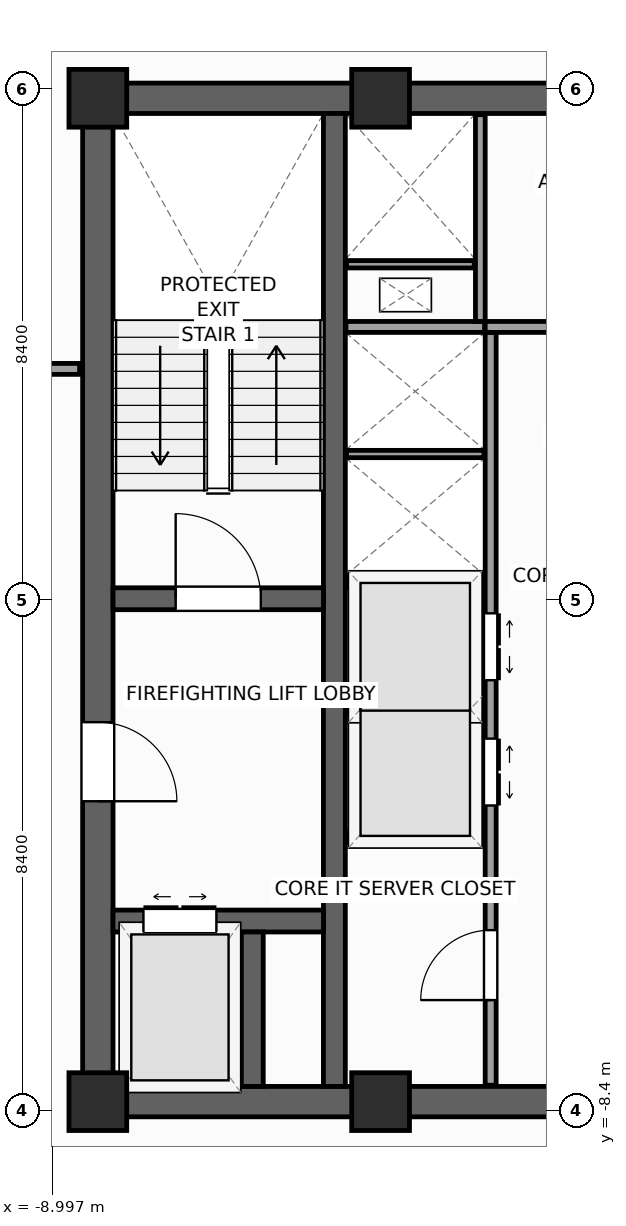
"""IFC4 building model, lengths in metres.
Left out: names, types, materials, properties, quantities, classifications, styles, units other than length and angle.
Written with IfcOpenShell. Run it as: python <this file> out.ifc"""

import sys

from ifc_helpers import new_model, si_unit, direction, frame, frame_2d, origin, origin_2d, place, context, subcontext, project, spatial, rectangle, extrude, source, transform, mapped, element, fill, save


model = new_model("IFC4")
c1 = context("Model", 3, precision=1e-05, world=origin(), true_north=direction((0.0, 1.0)))
c2 = subcontext(c1, "Body", "Model", "MODEL_VIEW")
j1 = project(units=[si_unit("LENGTHUNIT", "METRE"), si_unit("PLANEANGLEUNIT", "RADIAN")], contexts=[c1])
p1 = place(None, origin())
s1 = spatial("IfcSite", under=j1, at=p1, CompositionType="ELEMENT")
p2 = place(p1, origin())
s2 = spatial("IfcBuilding", under=s1, at=p2, CompositionType="ELEMENT")
p3 = place(p2, frame((0.0, 0.0, 229.0)))
s3 = spatial("IfcBuildingStorey", under=s2, at=p3, CompositionType="ELEMENT", Elevation=229.0)
p4 = place(p3, frame((-8.5, -8.25, 0.0), z_axis=(0.0, 0.0, 1.0), x_axis=(1.0, 0.0, 0.0)))
e1 = element("IfcWall", 1, at=p4, inside=s3, PredefinedType="SHEAR", context=c2, shape_type="SweptSolid", body=[
    extrude(rectangle(XDim=17.0, YDim=0.5, at=frame_2d((8.5, 0.0))), origin(), (0.0, 0.0, 1.0), 3.9),
])
p5 = place(p4, frame((7.85, 0.0, 0.0)))
e2 = element("IfcOpeningElement", 2, at=p5, cuts=e1, PredefinedType="OPENING", context=c2, shape_type="SweptSolid", body=[
    extrude(rectangle(XDim=1.3, YDim=2.2, at=frame_2d((0.65, 1.1))), frame((0.0, 0.26, 0.0), z_axis=(0.0, -1.0, 0.0), x_axis=(1.0, 0.0, 0.0)), (0.0, 0.0, 1.0), 0.52),
])
p6 = place(p3, frame((-8.5, 8.25, 0.0), z_axis=(0.0, 0.0, 1.0), x_axis=(1.0, 0.0, 0.0)))
e3 = element("IfcWall", 3, at=p6, inside=s3, PredefinedType="SHEAR", context=c2, shape_type="SweptSolid", body=[
    extrude(rectangle(XDim=17.0, YDim=0.5, at=frame_2d((8.5, 0.0))), origin(), (0.0, 0.0, 1.0), 3.9),
])
p7 = place(p3, frame((-8.25, -8.0, 0.0), z_axis=(0.0, 0.0, 1.0), x_axis=(0.0, 1.0, 0.0)))
e4 = element("IfcWall", 4, at=p7, inside=s3, PredefinedType="SHEAR", context=c2, shape_type="SweptSolid", body=[
    extrude(rectangle(XDim=16.0, YDim=0.5, at=frame_2d((8.0, 0.0))), origin(), (0.0, 0.0, 1.0), 3.9),
])
p8 = place(p7, frame((4.69, 0.0, 0.0)))
e5 = element("IfcOpeningElement", 5, at=p8, cuts=e4, PredefinedType="OPENING", context=c2, shape_type="SweptSolid", body=[
    extrude(rectangle(XDim=1.3, YDim=2.2, at=frame_2d((0.65, 1.1))), frame((0.0, 0.26, 0.0), z_axis=(0.0, -1.0, 0.0), x_axis=(1.0, 0.0, 0.0)), (0.0, 0.0, 1.0), 0.52),
])
p9 = place(p3, frame((-4.36, -8.0, 0.0), z_axis=(0.0, 0.0, 1.0), x_axis=(0.0, 1.0, 0.0)))
e6 = element("IfcWall", 6, at=p9, inside=s3, PredefinedType="SHEAR", context=c2, shape_type="SweptSolid", body=[
    extrude(rectangle(XDim=16.0, YDim=0.36, at=frame_2d((8.0, 0.0))), origin(), (0.0, 0.0, 1.0), 3.9),
])
p10 = place(p3, frame((-8.0, 0.02, 0.0), z_axis=(0.0, 0.0, 1.0), x_axis=(1.0, 0.0, 0.0)))
e7 = element("IfcWall", 7, at=p10, inside=s3, PredefinedType="SHEAR", context=c2, shape_type="SweptSolid", body=[
    extrude(rectangle(XDim=3.46, YDim=0.36, at=frame_2d((1.73, 0.0))), origin(), (0.0, 0.0, 1.0), 3.9),
])
p11 = place(p10, frame((1.03, 0.0, 0.0)))
e8 = element("IfcOpeningElement", 8, at=p11, cuts=e7, PredefinedType="OPENING", context=c2, shape_type="SweptSolid", body=[
    extrude(rectangle(XDim=1.4, YDim=2.2, at=frame_2d((0.7, 1.1))), frame((0.0, 0.19, 0.0), z_axis=(0.0, -1.0, 0.0), x_axis=(1.0, 0.0, 0.0)), (0.0, 0.0, 1.0), 0.38),
])
p12 = place(p3, frame((-8.0, -5.28, 0.0), z_axis=(0.0, 0.0, 1.0), x_axis=(1.0, 0.0, 0.0)))
e9 = element("IfcWall", 9, at=p12, inside=s3, PredefinedType="SHEAR", context=c2, shape_type="SweptSolid", body=[
    extrude(rectangle(XDim=3.46, YDim=0.36, at=frame_2d((1.73, 0.0))), origin(), (0.0, 0.0, 1.0), 3.9),
])
p13 = place(p12, frame((0.5, 0.0, 0.0)))
e10 = element("IfcOpeningElement", 10, at=p13, cuts=e9, PredefinedType="OPENING", context=c2, shape_type="SweptSolid", body=[
    extrude(rectangle(XDim=1.2, YDim=2.25, at=frame_2d((0.6, 1.125))), frame((0.0, 0.19, 0.0), z_axis=(0.0, -1.0, 0.0), x_axis=(1.0, 0.0, 0.0)), (0.0, 0.0, 1.0), 0.38),
])
p14 = place(p3, frame((-5.71, -8.0, 0.0), z_axis=(0.0, 0.0, 1.0), x_axis=(0.0, 1.0, 0.0)))
e11 = element("IfcWall", 11, at=p14, inside=s3, PredefinedType="SHEAR", context=c2, shape_type="SweptSolid", body=[
    extrude(rectangle(XDim=2.54, YDim=0.36, at=frame_2d((1.27, 0.0))), origin(), (0.0, 0.0, 1.0), 3.9),
])
m1 = source(origin(), c2, "Body", "SweptSolid", [
    extrude(rectangle(XDim=0.95, YDim=0.95, at=origin_2d()), origin(), (0.0, 0.0, 1.0), 3.9),
])
for number, where, z_axis, x_axis in (
    (12, (-8.25, -8.25, 0.0), (0.0, 0.0, 1.0), (1.0, 0.0, 0.0)),
    (13, (-8.25, 8.25, 0.0), (0.0, 0.0, 1.0), (1.0, 0.0, 0.0)),
    (14, (-3.6, -8.25, 0.0), (0.0, 0.0, 1.0), (1.0, 0.0, 0.0)),
    (15, (-3.6, 8.25, 0.0), (0.0, 0.0, 1.0), (1.0, 0.0, 0.0)),
):
    element("IfcColumn", number, at=place(p3, frame(where, z_axis=z_axis, x_axis=x_axis)), inside=s3, PredefinedType="PILASTER", context=c2, shape_type="MappedRepresentation", body=[
        mapped(m1, transform((0.0, 0.0, 0.0), scale=1.0)),
    ])
p15 = place(p3, frame((-6.733, 29.154, 0.0), z_axis=(0.0, 0.0, 1.0), x_axis=(-0.629325378072, -0.77714192302, 0.0)))
e16 = element("IfcWall", 16, at=p15, inside=s3, PredefinedType="STANDARD", context=c2, shape_type="SweptSolid", body=[
    extrude(rectangle(XDim=36.84, YDim=0.34, at=frame_2d((18.42, 0.0))), origin(), (0.0, 0.0, 1.0), 2.96),
])
p16 = place(p15, frame((3.721, 0.0, 0.48)))
e17 = element("IfcOpeningElement", 17, at=p16, cuts=e16, PredefinedType="OPENING", context=c2, shape_type="SweptSolid", body=[
    extrude(rectangle(XDim=1.4, YDim=2.4, at=frame_2d((0.7, 1.2))), frame((0.0, 0.18, 0.0), z_axis=(0.0, -1.0, 0.0), x_axis=(1.0, 0.0, 0.0)), (0.0, 0.0, 1.0), 0.36),
])
p17 = place(p15, frame((9.809, 0.0, 0.58)))
e18 = element("IfcOpeningElement", 18, at=p17, cuts=e16, PredefinedType="OPENING", context=c2, shape_type="SweptSolid", body=[
    extrude(rectangle(XDim=1.75, YDim=2.3, at=frame_2d((0.875, 1.15))), frame((0.0, 0.18, 0.0), z_axis=(0.0, -1.0, 0.0), x_axis=(1.0, 0.0, 0.0)), (0.0, 0.0, 1.0), 0.36),
])
p18 = place(p15, frame((16.058, 0.0, 0.58)))
e19 = element("IfcOpeningElement", 19, at=p18, cuts=e16, PredefinedType="OPENING", context=c2, shape_type="SweptSolid", body=[
    extrude(rectangle(XDim=1.75, YDim=2.3, at=frame_2d((0.875, 1.15))), frame((0.0, 0.18, 0.0), z_axis=(0.0, -1.0, 0.0), x_axis=(1.0, 0.0, 0.0)), (0.0, 0.0, 1.0), 0.36),
])
p19 = place(p15, frame((24.176, 0.0, 0.58)))
e20 = element("IfcOpeningElement", 20, at=p19, cuts=e16, PredefinedType="OPENING", context=c2, shape_type="SweptSolid", body=[
    extrude(rectangle(XDim=1.75, YDim=2.3, at=frame_2d((0.875, 1.15))), frame((0.0, 0.18, 0.0), z_axis=(0.0, -1.0, 0.0), x_axis=(1.0, 0.0, 0.0)), (0.0, 0.0, 1.0), 0.36),
])
p20 = place(p15, frame((30.232, 0.0, 0.48)))
e21 = element("IfcOpeningElement", 21, at=p20, cuts=e16, PredefinedType="OPENING", context=c2, shape_type="SweptSolid", body=[
    extrude(rectangle(XDim=1.4, YDim=2.4, at=frame_2d((0.7, 1.2))), frame((0.0, 0.18, 0.0), z_axis=(0.0, -1.0, 0.0), x_axis=(1.0, 0.0, 0.0)), (0.0, 0.0, 1.0), 0.36),
])
p21 = place(p3, frame((-29.154, -6.733, 0.0), z_axis=(0.0, 0.0, 1.0), x_axis=(0.77714192302, -0.629325378072, 0.0)))
e22 = element("IfcWall", 22, at=p21, inside=s3, PredefinedType="STANDARD", context=c2, shape_type="SweptSolid", body=[
    extrude(rectangle(XDim=36.84, YDim=0.34, at=frame_2d((18.42, 0.0))), origin(), (0.0, 0.0, 1.0), 2.96),
])
p22 = place(p21, frame((23.495, 0.0, 0.0)))
e23 = element("IfcOpeningElement", 23, at=p22, cuts=e22, PredefinedType="OPENING", context=c2, shape_type="SweptSolid", body=[
    extrude(rectangle(XDim=1.05, YDim=2.25, at=frame_2d((0.525, 1.125))), frame((0.0, 0.18, 0.0), z_axis=(0.0, -1.0, 0.0), x_axis=(1.0, 0.0, 0.0)), (0.0, 0.0, 1.0), 0.36),
])
p23 = place(p21, frame((3.721, 0.0, 0.48)))
e24 = element("IfcOpeningElement", 24, at=p23, cuts=e22, PredefinedType="OPENING", context=c2, shape_type="SweptSolid", body=[
    extrude(rectangle(XDim=1.4, YDim=2.4, at=frame_2d((0.7, 1.2))), frame((0.0, 0.18, 0.0), z_axis=(0.0, -1.0, 0.0), x_axis=(1.0, 0.0, 0.0)), (0.0, 0.0, 1.0), 0.36),
])
p24 = place(p21, frame((9.809, 0.0, 0.58)))
e25 = element("IfcOpeningElement", 25, at=p24, cuts=e22, PredefinedType="OPENING", context=c2, shape_type="SweptSolid", body=[
    extrude(rectangle(XDim=1.75, YDim=2.3, at=frame_2d((0.875, 1.15))), frame((0.0, 0.18, 0.0), z_axis=(0.0, -1.0, 0.0), x_axis=(1.0, 0.0, 0.0)), (0.0, 0.0, 1.0), 0.36),
])
p25 = place(p21, frame((16.058, 0.0, 0.58)))
e26 = element("IfcOpeningElement", 26, at=p25, cuts=e22, PredefinedType="OPENING", context=c2, shape_type="SweptSolid", body=[
    extrude(rectangle(XDim=1.75, YDim=2.3, at=frame_2d((0.875, 1.15))), frame((0.0, 0.18, 0.0), z_axis=(0.0, -1.0, 0.0), x_axis=(1.0, 0.0, 0.0)), (0.0, 0.0, 1.0), 0.36),
])
p26 = place(p21, frame((25.676, 0.0, 0.58)))
e27 = element("IfcOpeningElement", 27, at=p26, cuts=e22, PredefinedType="OPENING", context=c2, shape_type="SweptSolid", body=[
    extrude(rectangle(XDim=1.75, YDim=2.3, at=frame_2d((0.875, 1.15))), frame((0.0, 0.18, 0.0), z_axis=(0.0, -1.0, 0.0), x_axis=(1.0, 0.0, 0.0)), (0.0, 0.0, 1.0), 0.36),
])
p27 = place(p21, frame((30.982, 0.0, 0.48)))
e28 = element("IfcOpeningElement", 28, at=p27, cuts=e22, PredefinedType="OPENING", context=c2, shape_type="SweptSolid", body=[
    extrude(rectangle(XDim=1.4, YDim=2.4, at=frame_2d((0.7, 1.2))), frame((0.0, 0.18, 0.0), z_axis=(0.0, -1.0, 0.0), x_axis=(1.0, 0.0, 0.0)), (0.0, 0.0, 1.0), 0.36),
])
p28 = place(p3, frame((-1.79, -7.98, 0.0), z_axis=(0.0, 0.0, 1.0), x_axis=(0.0, 1.0, 0.0)))
e29 = element("IfcWall", 29, at=p28, inside=s3, PredefinedType="PARTITIONING", context=c2, shape_type="SweptSolid", body=[
    extrude(rectangle(XDim=12.38, YDim=0.18, at=frame_2d((6.19, 0.0))), origin(), (0.0, 0.0, 1.0), 3.66),
])
p29 = place(p28, frame((4.6, 0.0, 0.0)))
e30 = element("IfcOpeningElement", 30, at=p29, cuts=e29, PredefinedType="OPENING", context=c2, shape_type="SweptSolid", body=[
    extrude(rectangle(XDim=1.1, YDim=2.2, at=frame_2d((0.55, 1.1))), frame((0.0, 0.1, 0.0), z_axis=(0.0, -1.0, 0.0), x_axis=(1.0, 0.0, 0.0)), (0.0, 0.0, 1.0), 0.2),
])
p30 = place(p28, frame((6.66, 0.0, 0.0)))
e31 = element("IfcOpeningElement", 31, at=p30, cuts=e29, PredefinedType="OPENING", context=c2, shape_type="SweptSolid", body=[
    extrude(rectangle(XDim=1.1, YDim=2.2, at=frame_2d((0.55, 1.1))), frame((0.0, 0.1, 0.0), z_axis=(0.0, -1.0, 0.0), x_axis=(1.0, 0.0, 0.0)), (0.0, 0.0, 1.0), 0.2),
])
p31 = place(p28, frame((1.4, 0.0, 0.0)))
e32 = element("IfcOpeningElement", 32, at=p31, cuts=e29, PredefinedType="OPENING", context=c2, shape_type="SweptSolid", body=[
    extrude(rectangle(XDim=1.15, YDim=2.25, at=frame_2d((0.575, 1.125))), frame((0.0, 0.1, 0.0), z_axis=(0.0, -1.0, 0.0), x_axis=(1.0, 0.0, 0.0)), (0.0, 0.0, 1.0), 0.2),
])
p32 = place(p3, frame((-1.88, 4.49, 0.0), z_axis=(0.0, 0.0, 1.0), x_axis=(1.0, 0.0, 0.0)))
e33 = element("IfcWall", 33, at=p32, inside=s3, PredefinedType="PARTITIONING", context=c2, shape_type="SweptSolid", body=[
    extrude(rectangle(XDim=3.76, YDim=0.18, at=frame_2d((1.88, 0.0))), origin(), (0.0, 0.0, 1.0), 3.66),
])
p33 = place(p32, frame((1.305, 0.0, 0.0)))
e34 = element("IfcOpeningElement", 34, at=p33, cuts=e33, PredefinedType="OPENING", context=c2, shape_type="SweptSolid", body=[
    extrude(rectangle(XDim=1.15, YDim=2.25, at=frame_2d((0.575, 1.125))), frame((0.0, 0.1, 0.0), z_axis=(0.0, -1.0, 0.0), x_axis=(1.0, 0.0, 0.0)), (0.0, 0.0, 1.0), 0.2),
])
for number, where, z_axis, x_axis in (
    (35, (-4.17, -3.9, 0.0), (0.0, 0.0, 1.0), (1.0, 0.0, 0.0)),
    (36, (-4.17, 0.3, 0.0), (0.0, 0.0, 1.0), (1.0, 0.0, 0.0)),
    (37, (-4.17, 4.49, 0.0), (0.0, 0.0, 1.0), (1.0, 0.0, 0.0)),
):
    element("IfcWall", number, at=place(p3, frame(where, z_axis=z_axis, x_axis=x_axis)), inside=s3, PredefinedType="PARTITIONING", context=c2, shape_type="SweptSolid", body=[
        extrude(rectangle(XDim=2.28, YDim=0.18, at=frame_2d((1.14, 0.0))), origin(), (0.0, 0.0, 1.0), 3.66),
    ])
for number, where, z_axis, x_axis in (
    (38, (-4.16, -1.8, 0.0), (0.0, 0.0, 1.0), (1.0, 0.0, 0.0)),
    (39, (-4.16, 2.4, 0.0), (0.0, 0.0, 1.0), (1.0, 0.0, 0.0)),
):
    element("IfcWall", number, at=place(p3, frame(where, z_axis=z_axis, x_axis=x_axis)), inside=s3, PredefinedType="PARTITIONING", context=c2, shape_type="SweptSolid", body=[
        extrude(rectangle(XDim=2.26, YDim=0.12, at=frame_2d((1.13, 0.0))), origin(), (0.0, 0.0, 1.0), 3.66),
    ])
p34 = place(p3, frame((-1.96, 4.58, 0.0), z_axis=(0.0, 0.0, 1.0), x_axis=(0.0, 1.0, 0.0)))
e40 = element("IfcWall", 40, at=p34, inside=s3, PredefinedType="PARTITIONING", context=c2, shape_type="SweptSolid", body=[
    extrude(rectangle(XDim=3.4, YDim=0.16, at=frame_2d((1.7, 0.0))), origin(), (0.0, 0.0, 1.0), 3.66),
])
p35 = place(p3, frame((-4.16, 5.52, 0.0), z_axis=(0.0, 0.0, 1.0), x_axis=(1.0, 0.0, 0.0)))
e41 = element("IfcWall", 41, at=p35, inside=s3, PredefinedType="PARTITIONING", context=c2, shape_type="SweptSolid", body=[
    extrude(rectangle(XDim=2.1, YDim=0.12, at=frame_2d((1.05, 0.0))), origin(), (0.0, 0.0, 1.0), 3.66),
])
p36 = place(p3, frame((-12.45, 3.8, 0.0), z_axis=(0.0, 0.0, 1.0), x_axis=(1.0, 0.0, 0.0)))
e42 = element("IfcWall", 42, at=p36, inside=s3, PredefinedType="PARTITIONING", context=c2, shape_type="SweptSolid", body=[
    extrude(rectangle(XDim=3.9, YDim=0.18, at=frame_2d((1.95, 0.0))), origin(), (0.0, 0.0, 1.0), 3.66),
])
p37 = place(p36, frame((1.4, 0.0, 0.0)))
e43 = element("IfcOpeningElement", 43, at=p37, cuts=e42, PredefinedType="OPENING", context=c2, shape_type="SweptSolid", body=[
    extrude(rectangle(XDim=1.1, YDim=2.2, at=frame_2d((0.55, 1.1))), frame((0.0, 0.1, 0.0), z_axis=(0.0, -1.0, 0.0), x_axis=(1.0, 0.0, 0.0)), (0.0, 0.0, 1.0), 0.2),
])
m2 = source(origin(), c2, "Body", "SweptSolid", [
    extrude(rectangle(XDim=1.4, YDim=2.2, at=frame_2d((0.7, 1.1))), frame((0.0, 0.025, 0.0), z_axis=(0.0, -1.0, 0.0), x_axis=(1.0, 0.0, 0.0)), (0.0, 0.0, 1.0), 0.05),
])
p38 = place(p11, origin())
e44 = element("IfcDoor", 44, at=p38, inside=s3, OperationType="SINGLE_SWING_LEFT", PredefinedType="DOOR", context=c2, shape_type="MappedRepresentation", body=[
    mapped(m2, transform((0.0, 0.0, 0.0), scale=1.0)),
])
fill(e8, e44)
m3 = source(origin(), c2, "Body", "SweptSolid", [
    extrude(rectangle(XDim=1.3, YDim=2.2, at=frame_2d((0.65, 1.1))), frame((0.0, 0.025, 0.0), z_axis=(0.0, -1.0, 0.0), x_axis=(1.0, 0.0, 0.0)), (0.0, 0.0, 1.0), 0.05),
])
p39 = place(p8, frame((1.3, 0.0, 0.0), z_axis=(0.0, 0.0, 1.0), x_axis=(-1.0, 0.0, 0.0)))
e45 = element("IfcDoor", 45, at=p39, inside=s3, OperationType="SINGLE_SWING_LEFT", PredefinedType="DOOR", context=c2, shape_type="MappedRepresentation", body=[
    mapped(m3, transform((0.0, 0.0, 0.0), scale=1.0)),
])
fill(e5, e45)
m4 = source(origin(), c2, "Body", "SweptSolid", [
    extrude(rectangle(XDim=1.2, YDim=2.25, at=frame_2d((0.6, 1.125))), frame((0.0, 0.025, 0.0), z_axis=(0.0, -1.0, 0.0), x_axis=(1.0, 0.0, 0.0)), (0.0, 0.0, 1.0), 0.05),
])
p40 = place(p13, origin())
e46 = element("IfcDoor", 46, at=p40, inside=s3, OperationType="DOUBLE_DOOR_SLIDING", PredefinedType="DOOR", context=c2, shape_type="MappedRepresentation", body=[
    mapped(m4, transform((0.0, 0.0, 0.0), scale=1.0)),
])
fill(e10, e46)
m5 = source(origin(), c2, "Body", "SweptSolid", [
    extrude(rectangle(XDim=1.1, YDim=2.2, at=frame_2d((0.55, 1.1))), frame((0.0, 0.025, 0.0), z_axis=(0.0, -1.0, 0.0), x_axis=(1.0, 0.0, 0.0)), (0.0, 0.0, 1.0), 0.05),
])
p41 = place(p29, frame((1.1, 0.0, 0.0), z_axis=(0.0, 0.0, 1.0), x_axis=(-1.0, 0.0, 0.0)))
e47 = element("IfcDoor", 47, at=p41, inside=s3, OperationType="DOUBLE_DOOR_SLIDING", PredefinedType="DOOR", context=c2, shape_type="MappedRepresentation", body=[
    mapped(m5, transform((0.0, 0.0, 0.0), scale=1.0)),
])
fill(e30, e47)
p42 = place(p30, frame((1.1, 0.0, 0.0), z_axis=(0.0, 0.0, 1.0), x_axis=(-1.0, 0.0, 0.0)))
e48 = element("IfcDoor", 48, at=p42, inside=s3, OperationType="DOUBLE_DOOR_SLIDING", PredefinedType="DOOR", context=c2, shape_type="MappedRepresentation", body=[
    mapped(m5, transform((0.0, 0.0, 0.0), scale=1.0)),
])
fill(e31, e48)
m6 = source(origin(), c2, "Body", "SweptSolid", [
    extrude(rectangle(XDim=1.15, YDim=2.25, at=frame_2d((0.575, 1.125))), frame((0.0, 0.025, 0.0), z_axis=(0.0, -1.0, 0.0), x_axis=(1.0, 0.0, 0.0)), (0.0, 0.0, 1.0), 0.05),
])
p43 = place(p31, origin())
e49 = element("IfcDoor", 49, at=p43, inside=s3, OperationType="SINGLE_SWING_LEFT", PredefinedType="DOOR", context=c2, shape_type="MappedRepresentation", body=[
    mapped(m6, transform((0.0, 0.0, 0.0), scale=1.0)),
])
fill(e32, e49)
save(model, sys.argv[1])
